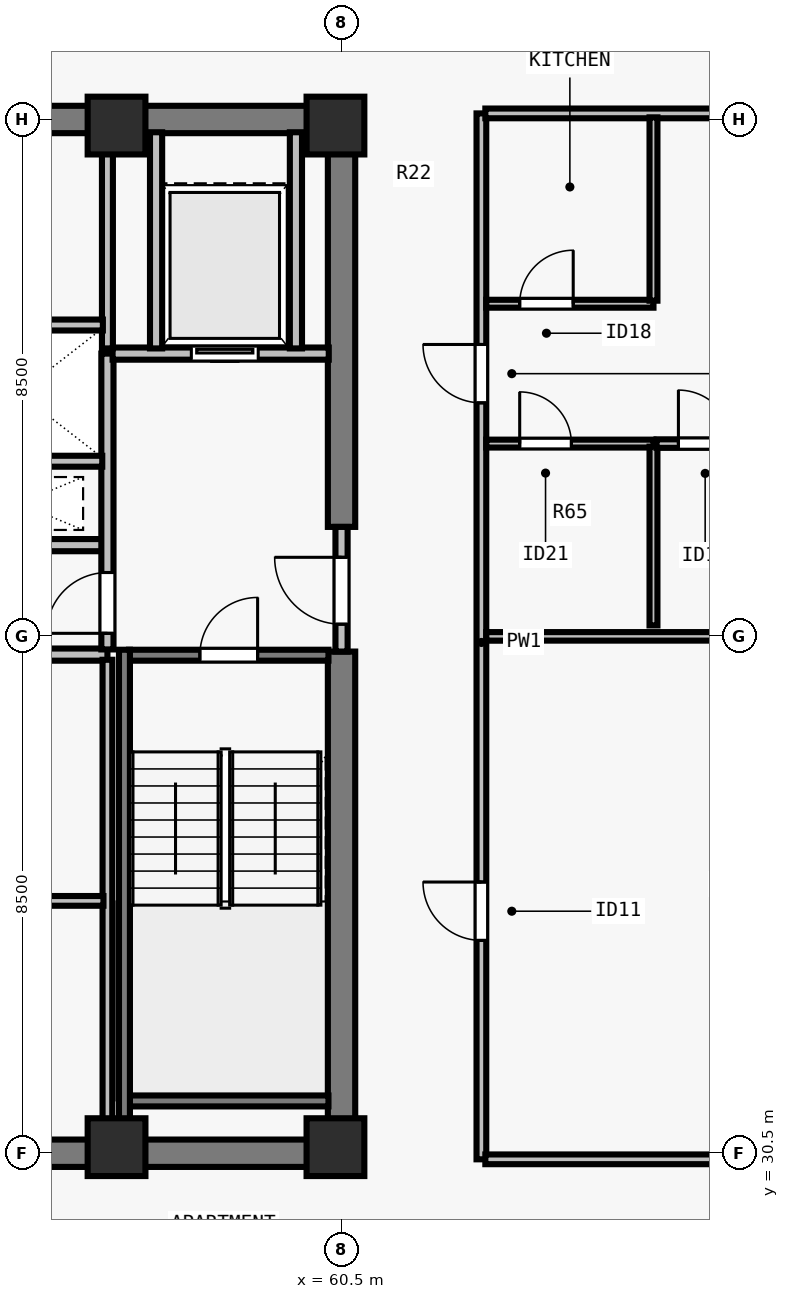
"""IFC4 building model, lengths in metres.
Left out: names, types, materials, properties, quantities, classifications, styles, units other than length and angle.
Written with IfcOpenShell. Run it as: python <this file> out.ifc"""

import sys

from ifc_helpers import new_model, si_unit, direction, frame, frame_2d, origin, origin_2d, place, context, subcontext, project, spatial, rectangle, extrude, element, fill, save


model = new_model("IFC4")
c1 = context("Model", 3, precision=1e-05, world=origin(), true_north=direction((0.0, 1.0)))
c2 = subcontext(c1, "Body", "Model", "MODEL_VIEW")
j1 = project(units=[si_unit("LENGTHUNIT", "METRE"), si_unit("PLANEANGLEUNIT", "RADIAN")], contexts=[c1])
p1 = place(None, origin())
s1 = spatial("IfcSite", under=j1, at=p1, CompositionType="ELEMENT")
p2 = place(p1, origin())
s2 = spatial("IfcBuilding", under=s1, at=p2, CompositionType="ELEMENT")
p3 = place(p2, frame((0.0, 0.0, 241.0)))
s3 = spatial("IfcBuildingStorey", under=s2, at=p3, CompositionType="ELEMENT", Elevation=241.0)
for number, where, z_axis, x_axis in (
    (1, (56.8, 30.6, 0.0), (0.0, 0.0, 1.0), (1.0, 0.0, 0.0)),
    (2, (60.4, 30.6, 0.0), (0.0, 0.0, 1.0), (1.0, 0.0, 0.0)),
    (3, (56.8, 47.4, 0.0), (0.0, 0.0, 1.0), (1.0, 0.0, 0.0)),
    (4, (60.4, 47.4, 0.0), (0.0, 0.0, 1.0), (1.0, 0.0, 0.0)),
):
    element("IfcColumn", number, at=place(p3, frame(where, z_axis=z_axis, x_axis=x_axis)), inside=s3, PredefinedType="COLUMN", context=c2, shape_type="SweptSolid", body=[
        extrude(rectangle(XDim=0.95, YDim=0.95, at=origin_2d()), origin(), (0.0, 0.0, 1.0), 3.5),
    ])
for number, where, z_axis, x_axis in (
    (5, (43.275, 30.5, 0.0), (0.0, 0.0, 1.0), (1.0, 0.0, 0.0)),
    (6, (43.275, 47.5, 0.0), (0.0, 0.0, 1.0), (1.0, 0.0, 0.0)),
):
    element("IfcWall", number, at=place(p3, frame(where, z_axis=z_axis, x_axis=x_axis)), inside=s3, PredefinedType="SHEAR", context=c2, shape_type="SweptSolid", body=[
        extrude(rectangle(XDim=17.45, YDim=0.45, at=frame_2d((8.725, 0.0))), origin(), (0.0, 0.0, 1.0), 3.29),
    ])
p4 = place(p3, frame((60.5, 30.715, 0.0), z_axis=(0.0, 0.0, 1.0), x_axis=(0.0, 1.0, 0.0)))
e7 = element("IfcWall", 7, at=p4, inside=s3, PredefinedType="SHEAR", context=c2, shape_type="SweptSolid", body=[
    extrude(rectangle(XDim=8.035, YDim=0.45, at=frame_2d((4.018, 0.0))), origin(), (0.0, 0.0, 1.0), 3.29),
])
p5 = place(p3, frame((60.5, 40.8, 0.0), z_axis=(0.0, 0.0, 1.0), x_axis=(0.0, 1.0, 0.0)))
e8 = element("IfcWall", 8, at=p5, inside=s3, PredefinedType="SHEAR", context=c2, shape_type="SweptSolid", body=[
    extrude(rectangle(XDim=6.485, YDim=0.45, at=frame_2d((3.242, 0.0))), origin(), (0.0, 0.0, 1.0), 3.29),
])
for number, where, z_axis, x_axis in (
    (9, (53.7, 38.7, 0.0), (0.0, 0.0, 1.0), (1.0, 0.0, 0.0)),
    (10, (53.7, 40.5, 0.0), (0.0, 0.0, 1.0), (1.0, 0.0, 0.0)),
):
    element("IfcWall", number, at=place(p3, frame(where, z_axis=z_axis, x_axis=x_axis)), inside=s3, PredefinedType="SOLIDWALL", context=c2, shape_type="SweptSolid", body=[
        extrude(rectangle(XDim=2.95, YDim=0.2, at=frame_2d((1.475, 0.0))), origin(), (0.0, 0.0, 1.0), 3.29),
    ])
p6 = place(p3, frame((60.5, 38.75, 0.0), z_axis=(0.0, 0.0, 1.0), x_axis=(0.0, 1.0, 0.0)))
e11 = element("IfcWall", 11, at=p6, inside=s3, PredefinedType="SOLIDWALL", context=c2, shape_type="SweptSolid", body=[
    extrude(rectangle(XDim=2.05, YDim=0.2, at=frame_2d((1.025, 0.0))), origin(), (0.0, 0.0, 1.0), 3.29),
])
p7 = place(p6, frame((0.45, 0.0, 0.0)))
e12 = element("IfcOpeningElement", 12, at=p7, cuts=e11, PredefinedType="OPENING", context=c2, shape_type="SweptSolid", body=[
    extrude(rectangle(XDim=1.1, YDim=2.15, at=frame_2d((0.55, 1.075))), frame((0.0, 0.11, 0.0), z_axis=(0.0, -1.0, 0.0), x_axis=(1.0, 0.0, 0.0)), (0.0, 0.0, 1.0), 0.22),
])
p8 = place(p3, frame((56.65, 38.785, 0.0), z_axis=(0.0, 0.0, 1.0), x_axis=(0.0, 1.0, 0.0)))
e13 = element("IfcWall", 13, at=p8, inside=s3, PredefinedType="SOLIDWALL", context=c2, shape_type="SweptSolid", body=[
    extrude(rectangle(XDim=4.865, YDim=0.2, at=frame_2d((2.433, 0.0))), origin(), (0.0, 0.0, 1.0), 3.29),
])
p9 = place(p8, frame((0.265, 0.0, 0.0)))
e14 = element("IfcOpeningElement", 14, at=p9, cuts=e13, PredefinedType="OPENING", context=c2, shape_type="SweptSolid", body=[
    extrude(rectangle(XDim=1.0, YDim=2.15, at=frame_2d((0.5, 1.075))), frame((0.0, 0.11, 0.0), z_axis=(0.0, -1.0, 0.0), x_axis=(1.0, 0.0, 0.0)), (0.0, 0.0, 1.0), 0.22),
])
p10 = place(p3, frame((56.735, 43.65, 0.0), z_axis=(0.0, 0.0, 1.0), x_axis=(1.0, 0.0, 0.0)))
e15 = element("IfcWall", 15, at=p10, inside=s3, PredefinedType="SOLIDWALL", context=c2, shape_type="SweptSolid", body=[
    extrude(rectangle(XDim=3.555, YDim=0.2, at=frame_2d((1.777, 0.0))), origin(), (0.0, 0.0, 1.0), 3.29),
])
p11 = place(p10, frame((1.295, 0.0, 0.0)))
e16 = element("IfcOpeningElement", 16, at=p11, cuts=e15, PredefinedType="OPENING", context=c2, shape_type="SweptSolid", body=[
    extrude(rectangle(XDim=1.1, YDim=2.2, at=frame_2d((0.55, 1.1))), frame((0.0, 0.11, 0.0), z_axis=(0.0, -1.0, 0.0), x_axis=(1.0, 0.0, 0.0)), (0.0, 0.0, 1.0), 0.22),
])
for number, where, z_axis, x_axis in (
    (17, (57.45, 43.735, 0.0), (0.0, 0.0, 1.0), (0.0, 1.0, 0.0)),
    (18, (59.75, 43.735, 0.0), (0.0, 0.0, 1.0), (0.0, 1.0, 0.0)),
):
    element("IfcWall", number, at=place(p3, frame(where, z_axis=z_axis, x_axis=x_axis)), inside=s3, PredefinedType="SOLIDWALL", context=c2, shape_type="SweptSolid", body=[
        extrude(rectangle(XDim=3.555, YDim=0.2, at=frame_2d((1.777, 0.0))), origin(), (0.0, 0.0, 1.0), 3.29),
    ])
p12 = place(p3, frame((56.65, 30.71, 0.0), z_axis=(0.0, 0.0, 1.0), x_axis=(0.0, 1.0, 0.0)))
e19 = element("IfcWall", 19, at=p12, inside=s3, PredefinedType="PARTITIONING", context=c2, shape_type="SweptSolid", body=[
    extrude(rectangle(XDim=7.905, YDim=0.16, at=frame_2d((3.953, 0.0))), origin(), (0.0, 0.0, 1.0), 3.29),
])
p13 = place(p3, frame((53.785, 34.65, 0.0), z_axis=(0.0, 0.0, 1.0), x_axis=(1.0, 0.0, 0.0)))
e20 = element("IfcWall", 20, at=p13, inside=s3, PredefinedType="PARTITIONING", context=c2, shape_type="SweptSolid", body=[
    extrude(rectangle(XDim=2.8, YDim=0.16, at=frame_2d((1.4, 0.0))), origin(), (0.0, 0.0, 1.0), 3.29),
])
p14 = place(p3, frame((56.65, 43.735, 0.0), z_axis=(0.0, 0.0, 1.0), x_axis=(0.0, 1.0, 0.0)))
e21 = element("IfcWall", 21, at=p14, inside=s3, PredefinedType="SOLIDWALL", context=c2, shape_type="SweptSolid", body=[
    extrude(rectangle(XDim=3.555, YDim=0.18, at=frame_2d((1.777, 0.0))), origin(), (0.0, 0.0, 1.0), 3.29),
])
p15 = place(p3, frame((53.785, 41.88, 0.0), z_axis=(0.0, 0.0, 1.0), x_axis=(1.0, 0.0, 0.0)))
e22 = element("IfcWall", 22, at=p15, inside=s3, PredefinedType="SOLIDWALL", context=c2, shape_type="SweptSolid", body=[
    extrude(rectangle(XDim=2.78, YDim=0.18, at=frame_2d((1.39, 0.0))), origin(), (0.0, 0.0, 1.0), 3.29),
])
p16 = place(p3, frame((53.785, 44.12, 0.0), z_axis=(0.0, 0.0, 1.0), x_axis=(1.0, 0.0, 0.0)))
e23 = element("IfcWall", 23, at=p16, inside=s3, PredefinedType="SOLIDWALL", context=c2, shape_type="SweptSolid", body=[
    extrude(rectangle(XDim=2.79, YDim=0.18, at=frame_2d((1.395, 0.0))), origin(), (0.0, 0.0, 1.0), 3.29),
])
p17 = place(p3, frame((62.8, 30.4, 0.0), z_axis=(0.0, 0.0, 1.0), x_axis=(0.0, 1.0, 0.0)))
e24 = element("IfcWall", 24, at=p17, inside=s3, PredefinedType="PARTITIONING", context=c2, shape_type="SweptSolid", body=[
    extrude(rectangle(XDim=17.2, YDim=0.16, at=frame_2d((8.6, 0.0))), origin(), (0.0, 0.0, 1.0), 3.29),
])
p18 = place(p17, frame((3.6, 0.0, 0.0)))
e25 = element("IfcOpeningElement", 25, at=p18, cuts=e24, PredefinedType="OPENING", context=c2, shape_type="SweptSolid", body=[
    extrude(rectangle(XDim=0.96, YDim=2.12, at=frame_2d((0.48, 1.06))), frame((0.0, 0.09, 0.0), z_axis=(0.0, -1.0, 0.0), x_axis=(1.0, 0.0, 0.0)), (0.0, 0.0, 1.0), 0.18),
])
p19 = place(p17, frame((12.44, 0.0, 0.0)))
e26 = element("IfcOpeningElement", 26, at=p19, cuts=e24, PredefinedType="OPENING", context=c2, shape_type="SweptSolid", body=[
    extrude(rectangle(XDim=0.96, YDim=2.18, at=frame_2d((0.48, 1.09))), frame((0.0, 0.09, 0.0), z_axis=(0.0, -1.0, 0.0), x_axis=(1.0, 0.0, 0.0)), (0.0, 0.0, 1.0), 0.18),
])
for number, where, z_axis, x_axis in (
    (27, (62.865, 30.4, 0.0), (0.0, 0.0, 1.0), (1.0, 0.0, 0.0)),
    (28, (62.865, 47.6, 0.0), (0.0, 0.0, 1.0), (1.0, 0.0, 0.0)),
):
    element("IfcWall", number, at=place(p3, frame(where, z_axis=z_axis, x_axis=x_axis)), inside=s3, PredefinedType="PARTITIONING", context=c2, shape_type="SweptSolid", body=[
        extrude(rectangle(XDim=11.33, YDim=0.16, at=frame_2d((5.665, 0.0))), origin(), (0.0, 0.0, 1.0), 3.29),
    ])
p20 = place(p3, frame((62.88, 39.0, 0.0), z_axis=(0.0, 0.0, 1.0), x_axis=(1.0, 0.0, 0.0)))
e29 = element("IfcWall", 29, at=p20, inside=s3, PredefinedType="PARTITIONING", context=c2, shape_type="SweptSolid", body=[
    extrude(rectangle(XDim=11.315, YDim=0.14, at=frame_2d((5.658, 0.0))), origin(), (0.0, 0.0, 1.0), 3.29),
])
p21 = place(p3, frame((62.88, 42.17, 0.0), z_axis=(0.0, 0.0, 1.0), x_axis=(1.0, 0.0, 0.0)))
e30 = element("IfcWall", 30, at=p21, inside=s3, PredefinedType="PLUMBINGWALL", context=c2, shape_type="SweptSolid", body=[
    extrude(rectangle(XDim=2.75, YDim=0.13, at=frame_2d((1.375, 0.0))), origin(), (0.0, 0.0, 1.0), 3.29),
])
p22 = place(p21, frame((0.55, 0.0, 0.0)))
e31 = element("IfcOpeningElement", 31, at=p22, cuts=e30, PredefinedType="OPENING", context=c2, shape_type="SweptSolid", body=[
    extrude(rectangle(XDim=0.85, YDim=2.08, at=frame_2d((0.425, 1.04))), frame((0.0, 0.075, 0.0), z_axis=(0.0, -1.0, 0.0), x_axis=(1.0, 0.0, 0.0)), (0.0, 0.0, 1.0), 0.15),
])
p23 = place(p3, frame((65.63, 39.18, 0.0), z_axis=(0.0, 0.0, 1.0), x_axis=(0.0, 1.0, 0.0)))
e32 = element("IfcWall", 32, at=p23, inside=s3, PredefinedType="PLUMBINGWALL", context=c2, shape_type="SweptSolid", body=[
    extrude(rectangle(XDim=2.94, YDim=0.13, at=frame_2d((1.47, 0.0))), origin(), (0.0, 0.0, 1.0), 3.29),
])
p24 = place(p3, frame((62.88, 44.47, 0.0), z_axis=(0.0, 0.0, 1.0), x_axis=(1.0, 0.0, 0.0)))
e33 = element("IfcWall", 33, at=p24, inside=s3, PredefinedType="PLUMBINGWALL", context=c2, shape_type="SweptSolid", body=[
    extrude(rectangle(XDim=2.75, YDim=0.13, at=frame_2d((1.375, 0.0))), origin(), (0.0, 0.0, 1.0), 3.29),
])
p25 = place(p24, frame((0.55, 0.0, 0.0)))
e34 = element("IfcOpeningElement", 34, at=p25, cuts=e33, PredefinedType="OPENING", context=c2, shape_type="SweptSolid", body=[
    extrude(rectangle(XDim=0.88, YDim=2.1, at=frame_2d((0.44, 1.05))), frame((0.0, 0.075, 0.0), z_axis=(0.0, -1.0, 0.0), x_axis=(1.0, 0.0, 0.0)), (0.0, 0.0, 1.0), 0.15),
])
p26 = place(p3, frame((65.63, 44.52, 0.0), z_axis=(0.0, 0.0, 1.0), x_axis=(0.0, 1.0, 0.0)))
e35 = element("IfcWall", 35, at=p26, inside=s3, PredefinedType="PLUMBINGWALL", context=c2, shape_type="SweptSolid", body=[
    extrude(rectangle(XDim=3.015, YDim=0.13, at=frame_2d((1.507, 0.0))), origin(), (0.0, 0.0, 1.0), 3.29),
])
p27 = place(p3, frame((65.68, 42.17, 0.0), z_axis=(0.0, 0.0, 1.0), x_axis=(1.0, 0.0, 0.0)))
e36 = element("IfcWall", 36, at=p27, inside=s3, PredefinedType="PARTITIONING", context=c2, shape_type="SweptSolid", body=[
    extrude(rectangle(XDim=8.44, YDim=0.14, at=frame_2d((4.22, 0.0))), origin(), (0.0, 0.0, 1.0), 3.29),
])
p28 = place(p27, frame((0.36, 0.0, 0.0)))
e37 = element("IfcOpeningElement", 37, at=p28, cuts=e36, PredefinedType="OPENING", context=c2, shape_type="SweptSolid", body=[
    extrude(rectangle(XDim=0.88, YDim=2.1, at=frame_2d((0.44, 1.05))), frame((0.0, 0.08, 0.0), z_axis=(0.0, -1.0, 0.0), x_axis=(1.0, 0.0, 0.0)), (0.0, 0.0, 1.0), 0.16),
])
p29 = place(p3, frame((57.005, 38.69, 0.0), z_axis=(0.0, 0.0, 1.0), x_axis=(1.0, 0.0, 0.0)))
e38 = element("IfcWall", 38, at=p29, inside=s3, PredefinedType="SOLIDWALL", context=c2, shape_type="SweptSolid", body=[
    extrude(rectangle(XDim=3.28, YDim=0.18, at=frame_2d((1.64, 0.0))), origin(), (0.0, 0.0, 1.0), 3.29),
])
p30 = place(p29, frame((1.165, 0.0, 0.0)))
e39 = element("IfcOpeningElement", 39, at=p30, cuts=e38, PredefinedType="OPENING", context=c2, shape_type="SweptSolid", body=[
    extrude(rectangle(XDim=0.95, YDim=2.15, at=frame_2d((0.475, 1.075))), frame((0.0, 0.1, 0.0), z_axis=(0.0, -1.0, 0.0), x_axis=(1.0, 0.0, 0.0)), (0.0, 0.0, 1.0), 0.2),
])
p31 = place(p3, frame((57.005, 31.36, 0.0), z_axis=(0.0, 0.0, 1.0), x_axis=(1.0, 0.0, 0.0)))
e40 = element("IfcWall", 40, at=p31, inside=s3, PredefinedType="SOLIDWALL", context=c2, shape_type="SweptSolid", body=[
    extrude(rectangle(XDim=3.28, YDim=0.18, at=frame_2d((1.64, 0.0))), origin(), (0.0, 0.0, 1.0), 3.29),
])
p32 = place(p3, frame((56.93, 38.78, 0.0), z_axis=(0.0, 0.0, 1.0), x_axis=(0.0, -1.0, 0.0)))
e41 = element("IfcWall", 41, at=p32, inside=s3, PredefinedType="SOLIDWALL", context=c2, shape_type="SweptSolid", body=[
    extrude(rectangle(XDim=8.067, YDim=0.18, at=frame_2d((4.034, 0.0))), origin(), (0.0, 0.0, 1.0), 3.29),
])
p33 = place(p7, origin())
e42 = element("IfcDoor", 42, at=p33, inside=s3, OperationType="SINGLE_SWING_RIGHT", PredefinedType="DOOR", context=c2, shape_type="SweptSolid", body=[
    extrude(rectangle(XDim=1.1, YDim=2.15, at=frame_2d((0.55, 1.075))), frame((0.0, 0.025, 0.0), z_axis=(0.0, -1.0, 0.0), x_axis=(1.0, 0.0, 0.0)), (0.0, 0.0, 1.0), 0.05),
])
fill(e12, e42)
p34 = place(p9, origin())
e43 = element("IfcDoor", 43, at=p34, inside=s3, OperationType="SINGLE_SWING_LEFT", PredefinedType="DOOR", context=c2, shape_type="SweptSolid", body=[
    extrude(rectangle(XDim=1.0, YDim=2.15, at=frame_2d((0.5, 1.075))), frame((0.0, 0.025, 0.0), z_axis=(0.0, -1.0, 0.0), x_axis=(1.0, 0.0, 0.0)), (0.0, 0.0, 1.0), 0.05),
])
fill(e14, e43)
p35 = place(p11, origin())
e44 = element("IfcDoor", 44, at=p35, inside=s3, OperationType="SLIDING_TO_LEFT", PredefinedType="DOOR", context=c2, shape_type="SweptSolid", body=[
    extrude(rectangle(XDim=1.1, YDim=2.2, at=frame_2d((0.55, 1.1))), frame((0.0, 0.025, 0.0), z_axis=(0.0, -1.0, 0.0), x_axis=(1.0, 0.0, 0.0)), (0.0, 0.0, 1.0), 0.05),
])
fill(e16, e44)
p36 = place(p18, origin())
e45 = element("IfcDoor", 45, at=p36, inside=s3, OperationType="SINGLE_SWING_RIGHT", PredefinedType="DOOR", context=c2, shape_type="SweptSolid", body=[
    extrude(rectangle(XDim=0.96, YDim=2.12, at=frame_2d((0.48, 1.06))), frame((0.0, 0.025, 0.0), z_axis=(0.0, -1.0, 0.0), x_axis=(1.0, 0.0, 0.0)), (0.0, 0.0, 1.0), 0.05),
])
fill(e25, e45)
p37 = place(p22, origin())
e46 = element("IfcDoor", 46, at=p37, inside=s3, OperationType="SINGLE_SWING_LEFT", PredefinedType="DOOR", context=c2, shape_type="SweptSolid", body=[
    extrude(rectangle(XDim=0.85, YDim=2.08, at=frame_2d((0.425, 1.04))), frame((0.0, 0.025, 0.0), z_axis=(0.0, -1.0, 0.0), x_axis=(1.0, 0.0, 0.0)), (0.0, 0.0, 1.0), 0.05),
])
fill(e31, e46)
p38 = place(p25, origin())
e47 = element("IfcDoor", 47, at=p38, inside=s3, OperationType="SINGLE_SWING_RIGHT", PredefinedType="DOOR", context=c2, shape_type="SweptSolid", body=[
    extrude(rectangle(XDim=0.88, YDim=2.1, at=frame_2d((0.44, 1.05))), frame((0.0, 0.025, 0.0), z_axis=(0.0, -1.0, 0.0), x_axis=(1.0, 0.0, 0.0)), (0.0, 0.0, 1.0), 0.05),
])
fill(e34, e47)
p39 = place(p28, origin())
e48 = element("IfcDoor", 48, at=p39, inside=s3, OperationType="SINGLE_SWING_LEFT", PredefinedType="DOOR", context=c2, shape_type="SweptSolid", body=[
    extrude(rectangle(XDim=0.88, YDim=2.1, at=frame_2d((0.44, 1.05))), frame((0.0, 0.025, 0.0), z_axis=(0.0, -1.0, 0.0), x_axis=(1.0, 0.0, 0.0)), (0.0, 0.0, 1.0), 0.05),
])
fill(e37, e48)
p40 = place(p19, origin())
e49 = element("IfcDoor", 49, at=p40, inside=s3, OperationType="SINGLE_SWING_RIGHT", PredefinedType="DOOR", context=c2, shape_type="SweptSolid", body=[
    extrude(rectangle(XDim=0.96, YDim=2.18, at=frame_2d((0.48, 1.09))), frame((0.0, 0.025, 0.0), z_axis=(0.0, -1.0, 0.0), x_axis=(1.0, 0.0, 0.0)), (0.0, 0.0, 1.0), 0.05),
])
fill(e26, e49)
p41 = place(p30, origin())
e50 = element("IfcDoor", 50, at=p41, inside=s3, OperationType="SINGLE_SWING_RIGHT", PredefinedType="DOOR", context=c2, shape_type="SweptSolid", body=[
    extrude(rectangle(XDim=0.95, YDim=2.15, at=frame_2d((0.475, 1.075))), frame((0.0, 0.025, 0.0), z_axis=(0.0, -1.0, 0.0), x_axis=(1.0, 0.0, 0.0)), (0.0, 0.0, 1.0), 0.05),
])
fill(e39, e50)
save(model, sys.argv[1])
